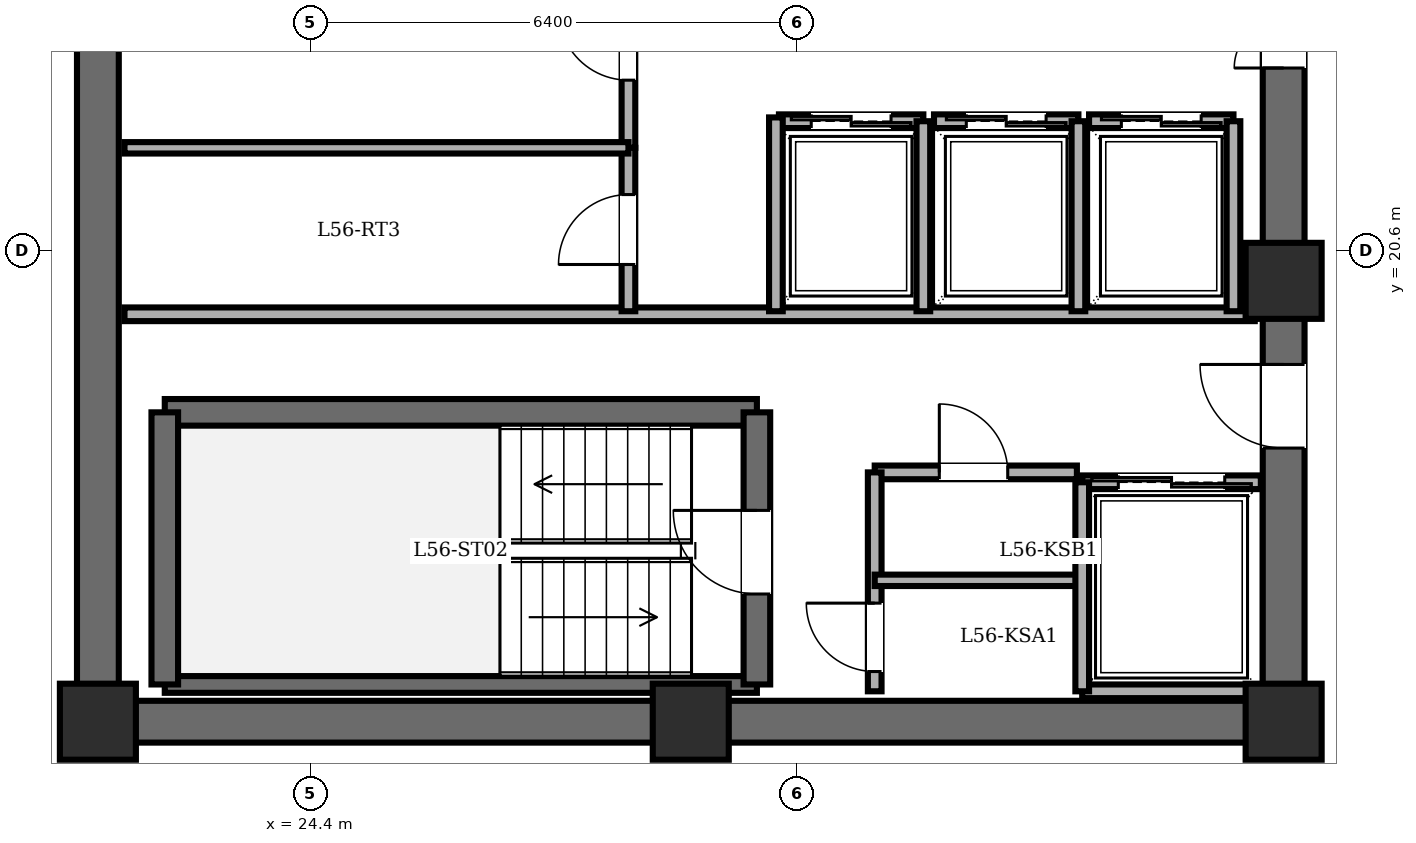
"""IFC4 building model, lengths in metres.
Left out: names, types, materials, properties, quantities, classifications, styles, units other than length and angle.
Written with IfcOpenShell. Run it as: python <this file> out.ifc"""

import sys

from ifc_helpers import new_model, si_unit, direction, frame, frame_2d, origin, origin_2d, place, context, subcontext, project, spatial, rectangle, extrude, element, fill, save


model = new_model("IFC4")
c1 = context("Model", 3, precision=1e-05, world=origin(), true_north=direction((0.0, 1.0)))
c2 = subcontext(c1, "Body", "Model", "MODEL_VIEW")
j1 = project(units=[si_unit("LENGTHUNIT", "METRE"), si_unit("PLANEANGLEUNIT", "RADIAN")], contexts=[c1])
p1 = place(None, origin())
s1 = spatial("IfcSite", under=j1, at=p1, CompositionType="ELEMENT")
p2 = place(p1, origin())
s2 = spatial("IfcBuilding", under=s1, at=p2, CompositionType="ELEMENT")
p3 = place(p2, frame((0.0, 0.0, 215.7)))
s3 = spatial("IfcBuildingStorey", under=s2, at=p3, CompositionType="ELEMENT", Elevation=215.7)
for number, where, z_axis, x_axis in (
    (1, (21.6, 14.4, 0.0), (0.0, 0.0, 1.0), (1.0, 0.0, 0.0)),
    (2, (29.4, 14.4, 0.0), (0.0, 0.0, 1.0), (1.0, 0.0, 0.0)),
    (3, (37.2, 14.4, 0.0), (0.0, 0.0, 1.0), (1.0, 0.0, 0.0)),
    (4, (37.2, 20.2, 0.0), (0.0, 0.0, 1.0), (1.0, 0.0, 0.0)),
):
    element("IfcColumn", number, at=place(p3, frame(where, z_axis=z_axis, x_axis=x_axis)), inside=s3, PredefinedType="COLUMN", context=c2, shape_type="SweptSolid", body=[
        extrude(rectangle(XDim=1.0, YDim=1.0, at=origin_2d()), origin(), (0.0, 0.0, 1.0), 3.6),
    ])
p4 = place(p3, frame((21.6, 14.4, 0.0), z_axis=(0.0, 0.0, 1.0), x_axis=(0.0, 1.0, 0.0)))
e5 = element("IfcWall", 5, at=p4, inside=s3, PredefinedType="SHEAR", context=c2, shape_type="SweptSolid", body=[
    extrude(rectangle(XDim=19.2, YDim=0.55, at=frame_2d((9.6, 0.0))), origin(), (0.0, 0.0, 1.0), 3.4),
])
p5 = place(p3, frame((37.2, 14.4, 0.0), z_axis=(0.0, 0.0, 1.0), x_axis=(-1.0, 0.0, 0.0)))
e6 = element("IfcWall", 6, at=p5, inside=s3, PredefinedType="SHEAR", context=c2, shape_type="SweptSolid", body=[
    extrude(rectangle(XDim=15.6, YDim=0.55, at=frame_2d((7.8, 0.0))), origin(), (0.0, 0.0, 1.0), 3.4),
])
p6 = place(p3, frame((37.2, 14.4, 0.0), z_axis=(0.0, 0.0, 1.0), x_axis=(0.0, 1.0, 0.0)))
e7 = element("IfcWall", 7, at=p6, inside=s3, PredefinedType="SHEAR", context=c2, shape_type="SweptSolid", body=[
    extrude(rectangle(XDim=19.2, YDim=0.55, at=frame_2d((9.6, 0.0))), origin(), (0.0, 0.0, 1.0), 3.4),
])
p7 = place(p6, frame((15.8, 0.0, 0.0)))
e8 = element("IfcOpeningElement", 8, at=p7, cuts=e7, PredefinedType="OPENING", context=c2, shape_type="SweptSolid", body=[
    extrude(rectangle(XDim=1.15, YDim=2.15, at=frame_2d((0.575, 1.075))), frame((0.0, 0.285, 0.0), z_axis=(0.0, -1.0, 0.0), x_axis=(1.0, 0.0, 0.0)), (0.0, 0.0, 1.0), 0.57),
])
p8 = place(p6, frame((3.6, 0.0, 0.0)))
e9 = element("IfcOpeningElement", 9, at=p8, cuts=e7, PredefinedType="OPENING", context=c2, shape_type="SweptSolid", body=[
    extrude(rectangle(XDim=1.1, YDim=2.15, at=frame_2d((0.55, 1.075))), frame((0.0, 0.285, 0.0), z_axis=(0.0, -1.0, 0.0), x_axis=(1.0, 0.0, 0.0)), (0.0, 0.0, 1.0), 0.57),
])
p9 = place(p6, frame((8.6, 0.0, 0.0)))
e10 = element("IfcOpeningElement", 10, at=p9, cuts=e7, PredefinedType="OPENING", context=c2, shape_type="SweptSolid", body=[
    extrude(rectangle(XDim=1.3, YDim=2.2, at=frame_2d((0.65, 1.1))), frame((0.0, 0.285, 0.0), z_axis=(0.0, -1.0, 0.0), x_axis=(1.0, 0.0, 0.0)), (0.0, 0.0, 1.0), 0.57),
])
p10 = place(p3, frame((22.48, 18.47, 0.0), z_axis=(0.0, 0.0, 1.0), x_axis=(1.0, 0.0, 0.0)))
e11 = element("IfcWall", 11, at=p10, inside=s3, PredefinedType="SOLIDWALL", context=c2, shape_type="SweptSolid", body=[
    extrude(rectangle(XDim=7.79, YDim=0.35, at=frame_2d((3.895, 0.0))), origin(), (0.0, 0.0, 1.0), 3.4),
])
p11 = place(p3, frame((22.48, 14.89, 0.0), z_axis=(0.0, 0.0, 1.0), x_axis=(1.0, 0.0, 0.0)))
e12 = element("IfcWall", 12, at=p11, inside=s3, PredefinedType="PARTITIONING", context=c2, shape_type="SweptSolid", body=[
    extrude(rectangle(XDim=7.79, YDim=0.22, at=frame_2d((3.895, 0.0))), origin(), (0.0, 0.0, 1.0), 3.4),
])
p12 = place(p3, frame((22.48, 14.89, 0.0), z_axis=(0.0, 0.0, 1.0), x_axis=(0.0, 1.0, 0.0)))
e13 = element("IfcWall", 13, at=p12, inside=s3, PredefinedType="SOLIDWALL", context=c2, shape_type="SweptSolid", body=[
    extrude(rectangle(XDim=3.58, YDim=0.35, at=frame_2d((1.79, 0.0))), origin(), (0.0, 0.0, 1.0), 3.4),
])
p13 = place(p3, frame((30.27, 14.89, 0.0), z_axis=(0.0, 0.0, 1.0), x_axis=(0.0, 1.0, 0.0)))
e14 = element("IfcWall", 14, at=p13, inside=s3, PredefinedType="SOLIDWALL", context=c2, shape_type="SweptSolid", body=[
    extrude(rectangle(XDim=3.58, YDim=0.35, at=frame_2d((1.79, 0.0))), origin(), (0.0, 0.0, 1.0), 3.4),
])
p14 = place(p13, frame((1.19, 0.0, 0.0)))
e15 = element("IfcOpeningElement", 15, at=p14, cuts=e14, PredefinedType="OPENING", context=c2, shape_type="SweptSolid", body=[
    extrude(rectangle(XDim=1.1, YDim=2.15, at=frame_2d((0.55, 1.075))), frame((0.0, 0.185, 0.0), z_axis=(0.0, -1.0, 0.0), x_axis=(1.0, 0.0, 0.0)), (0.0, 0.0, 1.0), 0.37),
])
p15 = place(p3, frame((21.95, 19.76, 0.0), z_axis=(0.0, 0.0, 1.0), x_axis=(1.0, 0.0, 0.0)))
e16 = element("IfcWall", 16, at=p15, inside=s3, PredefinedType="PARTITIONING", context=c2, shape_type="SweptSolid", body=[
    extrude(rectangle(XDim=14.87, YDim=0.18, at=frame_2d((7.435, 0.0))), origin(), (0.0, 0.0, 1.0), 3.4),
])
p16 = place(p3, frame((31.82, 17.68, 0.0), z_axis=(0.0, 0.0, 1.0), x_axis=(1.0, 0.0, 0.0)))
e17 = element("IfcWall", 17, at=p16, inside=s3, PredefinedType="PARTITIONING", context=c2, shape_type="SweptSolid", body=[
    extrude(rectangle(XDim=2.66, YDim=0.18, at=frame_2d((1.33, 0.0))), origin(), (0.0, 0.0, 1.0), 3.4),
])
p17 = place(p16, frame((0.85, 0.0, 0.0)))
e18 = element("IfcOpeningElement", 18, at=p17, cuts=e17, PredefinedType="OPENING", context=c2, shape_type="SweptSolid", body=[
    extrude(rectangle(XDim=0.9, YDim=2.05, at=frame_2d((0.45, 1.025))), frame((0.0, 0.1, 0.0), z_axis=(0.0, -1.0, 0.0), x_axis=(1.0, 0.0, 0.0)), (0.0, 0.0, 1.0), 0.2),
])
p18 = place(p3, frame((31.82, 14.8, 0.0), z_axis=(0.0, 0.0, 1.0), x_axis=(0.0, 1.0, 0.0)))
e19 = element("IfcWall", 19, at=p18, inside=s3, PredefinedType="PARTITIONING", context=c2, shape_type="SweptSolid", body=[
    extrude(rectangle(XDim=2.88, YDim=0.18, at=frame_2d((1.44, 0.0))), origin(), (0.0, 0.0, 1.0), 3.4),
])
p19 = place(p18, frame((0.26, 0.0, 0.0)))
e20 = element("IfcOpeningElement", 20, at=p19, cuts=e19, PredefinedType="OPENING", context=c2, shape_type="SweptSolid", body=[
    extrude(rectangle(XDim=0.9, YDim=2.05, at=frame_2d((0.45, 1.025))), frame((0.0, 0.1, 0.0), z_axis=(0.0, -1.0, 0.0), x_axis=(1.0, 0.0, 0.0)), (0.0, 0.0, 1.0), 0.2),
])
p20 = place(p3, frame((31.82, 16.26, 0.0), z_axis=(0.0, 0.0, 1.0), x_axis=(1.0, 0.0, 0.0)))
e21 = element("IfcWall", 21, at=p20, inside=s3, PredefinedType="PARTITIONING", context=c2, shape_type="SweptSolid", body=[
    extrude(rectangle(XDim=2.66, YDim=0.15, at=frame_2d((1.33, 0.0))), origin(), (0.0, 0.0, 1.0), 3.4),
])
p21 = place(p3, frame((34.55, 17.55, 0.0), z_axis=(0.0, 0.0, 1.0), x_axis=(1.0, 0.0, 0.0)))
e22 = element("IfcWall", 22, at=p21, inside=s3, PredefinedType="PARTITIONING", context=c2, shape_type="SweptSolid", body=[
    extrude(rectangle(XDim=2.35, YDim=0.18, at=frame_2d((1.175, 0.0))), origin(), (0.0, 0.0, 1.0), 3.4),
])
p22 = place(p21, frame((0.475, 0.0, 0.0)))
e23 = element("IfcOpeningElement", 23, at=p22, cuts=e22, PredefinedType="OPENING", context=c2, shape_type="SweptSolid", body=[
    extrude(rectangle(XDim=1.4, YDim=2.3, at=frame_2d((0.7, 1.15))), frame((0.0, 0.1, 0.0), z_axis=(0.0, -1.0, 0.0), x_axis=(1.0, 0.0, 0.0)), (0.0, 0.0, 1.0), 0.2),
])
p23 = place(p3, frame((36.9, 14.8, 0.0), z_axis=(0.0, 0.0, 1.0), x_axis=(-1.0, 0.0, 0.0)))
e24 = element("IfcWall", 24, at=p23, inside=s3, PredefinedType="PARTITIONING", context=c2, shape_type="SweptSolid", body=[
    extrude(rectangle(XDim=2.35, YDim=0.18, at=frame_2d((1.175, 0.0))), origin(), (0.0, 0.0, 1.0), 3.4),
])
p24 = place(p3, frame((34.55, 17.55, 0.0), z_axis=(0.0, 0.0, 1.0), x_axis=(0.0, -1.0, 0.0)))
e25 = element("IfcWall", 25, at=p24, inside=s3, PredefinedType="PARTITIONING", context=c2, shape_type="SweptSolid", body=[
    extrude(rectangle(XDim=2.75, YDim=0.18, at=frame_2d((1.375, 0.0))), origin(), (0.0, 0.0, 1.0), 3.4),
])
p25 = place(p3, frame((30.56, 22.3, 0.0), z_axis=(0.0, 0.0, 1.0), x_axis=(1.0, 0.0, 0.0)))
e26 = element("IfcWall", 26, at=p25, inside=s3, PredefinedType="PARTITIONING", context=c2, shape_type="SweptSolid", body=[
    extrude(rectangle(XDim=1.9, YDim=0.18, at=frame_2d((0.95, 0.0))), origin(), (0.0, 0.0, 1.0), 3.4),
])
p26 = place(p25, frame((0.425, 0.0, 0.0)))
e27 = element("IfcOpeningElement", 27, at=p26, cuts=e26, PredefinedType="OPENING", context=c2, shape_type="SweptSolid", body=[
    extrude(rectangle(XDim=1.05, YDim=2.2, at=frame_2d((0.525, 1.1))), frame((0.0, 0.1, 0.0), z_axis=(0.0, -1.0, 0.0), x_axis=(1.0, 0.0, 0.0)), (0.0, 0.0, 1.0), 0.2),
])
p27 = place(p3, frame((32.46, 19.8, 0.0), z_axis=(0.0, 0.0, 1.0), x_axis=(0.0, 1.0, 0.0)))
e28 = element("IfcWall", 28, at=p27, inside=s3, PredefinedType="PARTITIONING", context=c2, shape_type="SweptSolid", body=[
    extrude(rectangle(XDim=2.5, YDim=0.18, at=frame_2d((1.25, 0.0))), origin(), (0.0, 0.0, 1.0), 3.4),
])
p28 = place(p3, frame((32.6, 22.3, 0.0), z_axis=(0.0, 0.0, 1.0), x_axis=(1.0, 0.0, 0.0)))
e29 = element("IfcWall", 29, at=p28, inside=s3, PredefinedType="PARTITIONING", context=c2, shape_type="SweptSolid", body=[
    extrude(rectangle(XDim=1.9, YDim=0.18, at=frame_2d((0.95, 0.0))), origin(), (0.0, 0.0, 1.0), 3.4),
])
p29 = place(p28, frame((0.425, 0.0, 0.0)))
e30 = element("IfcOpeningElement", 30, at=p29, cuts=e29, PredefinedType="OPENING", context=c2, shape_type="SweptSolid", body=[
    extrude(rectangle(XDim=1.05, YDim=2.2, at=frame_2d((0.525, 1.1))), frame((0.0, 0.1, 0.0), z_axis=(0.0, -1.0, 0.0), x_axis=(1.0, 0.0, 0.0)), (0.0, 0.0, 1.0), 0.2),
])
p30 = place(p3, frame((34.5, 19.8, 0.0), z_axis=(0.0, 0.0, 1.0), x_axis=(0.0, 1.0, 0.0)))
e31 = element("IfcWall", 31, at=p30, inside=s3, PredefinedType="PARTITIONING", context=c2, shape_type="SweptSolid", body=[
    extrude(rectangle(XDim=2.5, YDim=0.18, at=frame_2d((1.25, 0.0))), origin(), (0.0, 0.0, 1.0), 3.4),
])
p31 = place(p3, frame((34.64, 22.3, 0.0), z_axis=(0.0, 0.0, 1.0), x_axis=(1.0, 0.0, 0.0)))
e32 = element("IfcWall", 32, at=p31, inside=s3, PredefinedType="PARTITIONING", context=c2, shape_type="SweptSolid", body=[
    extrude(rectangle(XDim=1.9, YDim=0.18, at=frame_2d((0.95, 0.0))), origin(), (0.0, 0.0, 1.0), 3.4),
])
p32 = place(p31, frame((0.425, 0.0, 0.0)))
e33 = element("IfcOpeningElement", 33, at=p32, cuts=e32, PredefinedType="OPENING", context=c2, shape_type="SweptSolid", body=[
    extrude(rectangle(XDim=1.05, YDim=2.2, at=frame_2d((0.525, 1.1))), frame((0.0, 0.1, 0.0), z_axis=(0.0, -1.0, 0.0), x_axis=(1.0, 0.0, 0.0)), (0.0, 0.0, 1.0), 0.2),
])
p33 = place(p3, frame((36.54, 19.8, 0.0), z_axis=(0.0, 0.0, 1.0), x_axis=(0.0, 1.0, 0.0)))
e34 = element("IfcWall", 34, at=p33, inside=s3, PredefinedType="PARTITIONING", context=c2, shape_type="SweptSolid", body=[
    extrude(rectangle(XDim=2.5, YDim=0.18, at=frame_2d((1.25, 0.0))), origin(), (0.0, 0.0, 1.0), 3.4),
])
p34 = place(p3, frame((30.52, 19.8, 0.0), z_axis=(0.0, 0.0, 1.0), x_axis=(0.0, 1.0, 0.0)))
e35 = element("IfcWall", 35, at=p34, inside=s3, PredefinedType="PARTITIONING", context=c2, shape_type="SweptSolid", body=[
    extrude(rectangle(XDim=2.55, YDim=0.18, at=frame_2d((1.275, 0.0))), origin(), (0.0, 0.0, 1.0), 3.4),
])
p35 = place(p3, frame((28.58, 21.95, 0.0), z_axis=(0.0, 0.0, 1.0), x_axis=(0.0, 1.0, 0.0)))
e36 = element("IfcWall", 36, at=p35, inside=s3, PredefinedType="PARTITIONING", context=c2, shape_type="SweptSolid", body=[
    extrude(rectangle(XDim=2.7, YDim=0.18, at=frame_2d((1.35, 0.0))), origin(), (0.0, 0.0, 1.0), 3.4),
])
p36 = place(p35, frame((0.89, 0.0, 0.0)))
e37 = element("IfcOpeningElement", 37, at=p36, cuts=e36, PredefinedType="OPENING", context=c2, shape_type="SweptSolid", body=[
    extrude(rectangle(XDim=0.92, YDim=2.1, at=frame_2d((0.46, 1.05))), frame((0.0, 0.1, 0.0), z_axis=(0.0, -1.0, 0.0), x_axis=(1.0, 0.0, 0.0)), (0.0, 0.0, 1.0), 0.2),
])
p37 = place(p3, frame((28.58, 19.8, 0.0), z_axis=(0.0, 0.0, 1.0), x_axis=(0.0, 1.0, 0.0)))
e38 = element("IfcWall", 38, at=p37, inside=s3, PredefinedType="PARTITIONING", context=c2, shape_type="SweptSolid", body=[
    extrude(rectangle(XDim=2.15, YDim=0.18, at=frame_2d((1.075, 0.0))), origin(), (0.0, 0.0, 1.0), 3.4),
])
p38 = place(p37, frame((0.615, 0.0, 0.0)))
e39 = element("IfcOpeningElement", 39, at=p38, cuts=e38, PredefinedType="OPENING", context=c2, shape_type="SweptSolid", body=[
    extrude(rectangle(XDim=0.92, YDim=2.1, at=frame_2d((0.46, 1.05))), frame((0.0, 0.1, 0.0), z_axis=(0.0, -1.0, 0.0), x_axis=(1.0, 0.0, 0.0)), (0.0, 0.0, 1.0), 0.2),
])
p39 = place(p3, frame((21.95, 21.95, 0.0), z_axis=(0.0, 0.0, 1.0), x_axis=(1.0, 0.0, 0.0)))
e40 = element("IfcWall", 40, at=p39, inside=s3, PredefinedType="PARTITIONING", context=c2, shape_type="SweptSolid", body=[
    extrude(rectangle(XDim=6.63, YDim=0.15, at=frame_2d((3.315, 0.0))), origin(), (0.0, 0.0, 1.0), 3.4),
])
p40 = place(p14, origin())
e41 = element("IfcDoor", 41, at=p40, inside=s3, OperationType="SINGLE_SWING_RIGHT", PredefinedType="DOOR", context=c2, shape_type="SweptSolid", body=[
    extrude(rectangle(XDim=1.1, YDim=2.15, at=frame_2d((0.55, 1.075))), frame((0.0, 0.025, 0.0), z_axis=(0.0, -1.0, 0.0), x_axis=(1.0, 0.0, 0.0)), (0.0, 0.0, 1.0), 0.05),
])
fill(e15, e41)
p41 = place(p8, origin())
e42 = element("IfcDoor", 42, at=p41, inside=s3, OperationType="SINGLE_SWING_RIGHT", PredefinedType="DOOR", context=c2, shape_type="SweptSolid", body=[
    extrude(rectangle(XDim=1.1, YDim=2.15, at=frame_2d((0.55, 1.075))), frame((0.0, 0.025, 0.0), z_axis=(0.0, -1.0, 0.0), x_axis=(1.0, 0.0, 0.0)), (0.0, 0.0, 1.0), 0.05),
])
fill(e9, e42)
p42 = place(p17, origin())
e43 = element("IfcDoor", 43, at=p42, inside=s3, OperationType="SINGLE_SWING_LEFT", PredefinedType="DOOR", context=c2, shape_type="SweptSolid", body=[
    extrude(rectangle(XDim=0.9, YDim=2.05, at=frame_2d((0.45, 1.025))), frame((0.0, 0.025, 0.0), z_axis=(0.0, -1.0, 0.0), x_axis=(1.0, 0.0, 0.0)), (0.0, 0.0, 1.0), 0.05),
])
fill(e18, e43)
p43 = place(p19, origin())
e44 = element("IfcDoor", 44, at=p43, inside=s3, OperationType="SINGLE_SWING_RIGHT", PredefinedType="DOOR", context=c2, shape_type="SweptSolid", body=[
    extrude(rectangle(XDim=0.9, YDim=2.05, at=frame_2d((0.45, 1.025))), frame((0.0, 0.025, 0.0), z_axis=(0.0, -1.0, 0.0), x_axis=(1.0, 0.0, 0.0)), (0.0, 0.0, 1.0), 0.05),
])
fill(e20, e44)
p44 = place(p22, origin())
e45 = element("IfcDoor", 45, at=p44, inside=s3, OperationType="DOUBLE_DOOR_SLIDING", PredefinedType="DOOR", context=c2, shape_type="SweptSolid", body=[
    extrude(rectangle(XDim=1.4, YDim=2.3, at=frame_2d((0.7, 1.15))), frame((0.0, 0.025, 0.0), z_axis=(0.0, -1.0, 0.0), x_axis=(1.0, 0.0, 0.0)), (0.0, 0.0, 1.0), 0.05),
])
fill(e23, e45)
p45 = place(p26, origin())
e46 = element("IfcDoor", 46, at=p45, inside=s3, OperationType="DOUBLE_DOOR_SLIDING", PredefinedType="DOOR", context=c2, shape_type="SweptSolid", body=[
    extrude(rectangle(XDim=1.05, YDim=2.2, at=frame_2d((0.525, 1.1))), frame((0.0, 0.025, 0.0), z_axis=(0.0, -1.0, 0.0), x_axis=(1.0, 0.0, 0.0)), (0.0, 0.0, 1.0), 0.05),
])
fill(e27, e46)
p46 = place(p29, origin())
e47 = element("IfcDoor", 47, at=p46, inside=s3, OperationType="DOUBLE_DOOR_SLIDING", PredefinedType="DOOR", context=c2, shape_type="SweptSolid", body=[
    extrude(rectangle(XDim=1.05, YDim=2.2, at=frame_2d((0.525, 1.1))), frame((0.0, 0.025, 0.0), z_axis=(0.0, -1.0, 0.0), x_axis=(1.0, 0.0, 0.0)), (0.0, 0.0, 1.0), 0.05),
])
fill(e30, e47)
p47 = place(p32, origin())
e48 = element("IfcDoor", 48, at=p47, inside=s3, OperationType="DOUBLE_DOOR_SLIDING", PredefinedType="DOOR", context=c2, shape_type="SweptSolid", body=[
    extrude(rectangle(XDim=1.05, YDim=2.2, at=frame_2d((0.525, 1.1))), frame((0.0, 0.025, 0.0), z_axis=(0.0, -1.0, 0.0), x_axis=(1.0, 0.0, 0.0)), (0.0, 0.0, 1.0), 0.05),
])
fill(e33, e48)
p48 = place(p36, origin())
e49 = element("IfcDoor", 49, at=p48, inside=s3, OperationType="SINGLE_SWING_RIGHT", PredefinedType="DOOR", context=c2, shape_type="SweptSolid", body=[
    extrude(rectangle(XDim=0.92, YDim=2.1, at=frame_2d((0.46, 1.05))), frame((0.0, 0.025, 0.0), z_axis=(0.0, -1.0, 0.0), x_axis=(1.0, 0.0, 0.0)), (0.0, 0.0, 1.0), 0.05),
])
fill(e37, e49)
p49 = place(p38, origin())
e50 = element("IfcDoor", 50, at=p49, inside=s3, OperationType="SINGLE_SWING_LEFT", PredefinedType="DOOR", context=c2, shape_type="SweptSolid", body=[
    extrude(rectangle(XDim=0.92, YDim=2.1, at=frame_2d((0.46, 1.05))), frame((0.0, 0.025, 0.0), z_axis=(0.0, -1.0, 0.0), x_axis=(1.0, 0.0, 0.0)), (0.0, 0.0, 1.0), 0.05),
])
fill(e39, e50)
p50 = place(p9, origin())
e51 = element("IfcDoor", 51, at=p50, inside=s3, OperationType="DOUBLE_DOOR_SINGLE_SWING", PredefinedType="DOOR", context=c2, shape_type="SweptSolid", body=[
    extrude(rectangle(XDim=1.3, YDim=2.2, at=frame_2d((0.65, 1.1))), frame((0.0, 0.025, 0.0), z_axis=(0.0, -1.0, 0.0), x_axis=(1.0, 0.0, 0.0)), (0.0, 0.0, 1.0), 0.05),
])
fill(e10, e51)
save(model, sys.argv[1])
